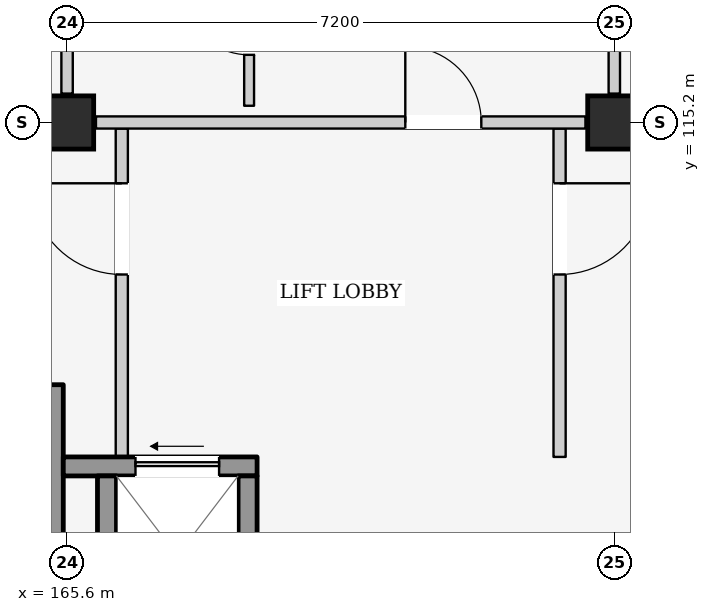
"""IFC4 building model, lengths in metres.
Left out: names, types, materials, properties, quantities, classifications, styles, units other than length and angle.
Written with IfcOpenShell. Run it as: python <this file> out.ifc"""

import sys

from ifc_helpers import new_model, si_unit, direction, frame, frame_2d, origin, origin_2d, place, context, subcontext, project, spatial, rectangle, extrude, element, fill, save


model = new_model("IFC4")
c1 = context("Model", 3, precision=1e-05, world=origin(), true_north=direction((0.0, 1.0)))
c2 = subcontext(c1, "Body", "Model", "MODEL_VIEW")
j1 = project(units=[si_unit("LENGTHUNIT", "METRE"), si_unit("PLANEANGLEUNIT", "RADIAN")], contexts=[c1])
p1 = place(None, origin())
s1 = spatial("IfcSite", under=j1, at=p1, CompositionType="ELEMENT")
p2 = place(p1, origin())
s2 = spatial("IfcBuilding", under=s1, at=p2, CompositionType="ELEMENT")
p3 = place(p2, frame((0.0, 0.0, 4.5)))
s3 = spatial("IfcBuildingStorey", under=s2, at=p3, CompositionType="ELEMENT", Elevation=4.5)
for number, where, z_axis, x_axis in (
    (1, (165.6, 115.2, 0.0), (0.0, 0.0, 1.0), (1.0, 0.0, 0.0)),
    (2, (172.8, 115.2, 0.0), (0.0, 0.0, 1.0), (1.0, 0.0, 0.0)),
):
    element("IfcColumn", number, at=place(p3, frame(where, z_axis=z_axis, x_axis=x_axis)), inside=s3, PredefinedType="COLUMN", context=c2, shape_type="SweptSolid", body=[
        extrude(rectangle(XDim=0.7, YDim=0.7, at=origin_2d()), origin(), (0.0, 0.0, 1.0), 4.5),
    ])
p4 = place(p3, frame((165.4, 108.15, 0.0), z_axis=(0.0, 0.0, 1.0), x_axis=(0.0, 1.0, 0.0)))
e3 = element("IfcWall", 3, at=p4, inside=s3, PredefinedType="SHEAR", context=c2, shape_type="SweptSolid", body=[
    extrude(rectangle(XDim=3.6, YDim=0.3, at=frame_2d((1.8, 0.0))), origin(), (0.0, 0.0, 1.0), 4.25),
])
p5 = place(p3, frame((166.32, 110.8, 0.0), z_axis=(0.0, 0.0, 1.0), x_axis=(0.0, 1.0, 0.0)))
e4 = element("IfcWall", 4, at=p5, inside=s3, PredefinedType="PARTITIONING", context=c2, shape_type="SweptSolid", body=[
    extrude(rectangle(XDim=4.32, YDim=0.16, at=frame_2d((2.16, 0.0))), origin(), (0.0, 0.0, 1.0), 4.25),
])
p6 = place(p5, frame((2.4, 0.0, 0.0)))
e5 = element("IfcOpeningElement", 5, at=p6, cuts=e4, PredefinedType="OPENING", context=c2, shape_type="SweptSolid", body=[
    extrude(rectangle(XDim=1.2, YDim=2.2, at=frame_2d((0.6, 1.1))), frame((0.0, 0.095, 0.0), z_axis=(0.0, -1.0, 0.0), x_axis=(1.0, 0.0, 0.0)), (0.0, 0.0, 1.0), 0.19),
])
p7 = place(p3, frame((172.08, 110.8, 0.0), z_axis=(0.0, 0.0, 1.0), x_axis=(0.0, 1.0, 0.0)))
e6 = element("IfcWall", 6, at=p7, inside=s3, PredefinedType="PARTITIONING", context=c2, shape_type="SweptSolid", body=[
    extrude(rectangle(XDim=4.32, YDim=0.16, at=frame_2d((2.16, 0.0))), origin(), (0.0, 0.0, 1.0), 4.25),
])
p8 = place(p7, frame((2.4, 0.0, 0.0)))
e7 = element("IfcOpeningElement", 7, at=p8, cuts=e6, PredefinedType="OPENING", context=c2, shape_type="SweptSolid", body=[
    extrude(rectangle(XDim=1.2, YDim=2.2, at=frame_2d((0.6, 1.1))), frame((0.0, 0.095, 0.0), z_axis=(0.0, -1.0, 0.0), x_axis=(1.0, 0.0, 0.0)), (0.0, 0.0, 1.0), 0.19),
])
p9 = place(p3, frame((165.55, 110.675, 0.0), z_axis=(0.0, 0.0, 1.0), x_axis=(1.0, 0.0, 0.0)))
e8 = element("IfcWall", 8, at=p9, inside=s3, PredefinedType="SHEAR", context=c2, shape_type="SweptSolid", body=[
    extrude(rectangle(XDim=2.55, YDim=0.25, at=frame_2d((1.275, 0.0))), origin(), (0.0, 0.0, 1.0), 4.25),
])
p10 = place(p9, frame((0.95, 0.0, 0.0)))
e9 = element("IfcOpeningElement", 9, at=p10, cuts=e8, PredefinedType="OPENING", context=c2, shape_type="SweptSolid", body=[
    extrude(rectangle(XDim=1.1, YDim=2.15, at=frame_2d((0.55, 1.075))), frame((0.0, 0.14, 0.0), z_axis=(0.0, -1.0, 0.0), x_axis=(1.0, 0.0, 0.0)), (0.0, 0.0, 1.0), 0.28),
])
for number, where, z_axis, x_axis in (
    (10, (166.125, 108.45, 0.0), (0.0, 0.0, 1.0), (0.0, 1.0, 0.0)),
    (11, (167.975, 108.45, 0.0), (0.0, 0.0, 1.0), (0.0, 1.0, 0.0)),
):
    element("IfcWall", number, at=place(p3, frame(where, z_axis=z_axis, x_axis=x_axis)), inside=s3, PredefinedType="SHEAR", context=c2, shape_type="SweptSolid", body=[
        extrude(rectangle(XDim=2.1, YDim=0.25, at=frame_2d((1.05, 0.0))), origin(), (0.0, 0.0, 1.0), 4.25),
    ])
p11 = place(p3, frame((165.6, 115.58, 0.0), z_axis=(0.0, 0.0, 1.0), x_axis=(0.0, 1.0, 0.0)))
e12 = element("IfcWall", 12, at=p11, inside=s3, PredefinedType="PARTITIONING", context=c2, shape_type="SweptSolid", body=[
    extrude(rectangle(XDim=6.44, YDim=0.15, at=frame_2d((3.22, 0.0))), origin(), (0.0, 0.0, 1.0), 3.685),
])
p12 = place(p3, frame((165.98, 115.2, 0.0), z_axis=(0.0, 0.0, 1.0), x_axis=(1.0, 0.0, 0.0)))
e13 = element("IfcWall", 13, at=p12, inside=s3, PredefinedType="PARTITIONING", context=c2, shape_type="SweptSolid", body=[
    extrude(rectangle(XDim=6.44, YDim=0.16, at=frame_2d((3.22, 0.0))), origin(), (0.0, 0.0, 1.0), 3.635),
])
p13 = place(p12, frame((4.07, 0.0, 0.0)))
e14 = element("IfcOpeningElement", 14, at=p13, cuts=e13, PredefinedType="OPENING", context=c2, shape_type="SweptSolid", body=[
    extrude(rectangle(XDim=1.0, YDim=2.15, at=frame_2d((0.5, 1.075))), frame((0.0, 0.095, 0.0), z_axis=(0.0, -1.0, 0.0), x_axis=(1.0, 0.0, 0.0)), (0.0, 0.0, 1.0), 0.19),
])
p14 = place(p3, frame((172.8, 115.58, 0.0), z_axis=(0.0, 0.0, 1.0), x_axis=(0.0, 1.0, 0.0)))
e15 = element("IfcWall", 15, at=p14, inside=s3, PredefinedType="PARTITIONING", context=c2, shape_type="SweptSolid", body=[
    extrude(rectangle(XDim=6.44, YDim=0.15, at=frame_2d((3.22, 0.0))), origin(), (0.0, 0.0, 1.0), 3.685),
])
p15 = place(p3, frame((167.995, 115.42, 0.0), z_axis=(0.0, 0.0, 1.0), x_axis=(0.0, 1.0, 0.0)))
e16 = element("IfcWall", 16, at=p15, inside=s3, PredefinedType="PARTITIONING", context=c2, shape_type="SweptSolid", body=[
    extrude(rectangle(XDim=2.22, YDim=0.13, at=frame_2d((1.11, 0.0))), origin(), (0.0, 0.0, 1.0), 4.25),
])
p16 = place(p15, frame((0.67, 0.0, 0.0)))
e17 = element("IfcOpeningElement", 17, at=p16, cuts=e16, PredefinedType="OPENING", context=c2, shape_type="SweptSolid", body=[
    extrude(rectangle(XDim=0.88, YDim=2.1, at=frame_2d((0.44, 1.05))), frame((0.0, 0.08, 0.0), z_axis=(0.0, -1.0, 0.0), x_axis=(1.0, 0.0, 0.0)), (0.0, 0.0, 1.0), 0.16),
])
p17 = place(p6, origin())
e18 = element("IfcDoor", 18, at=p17, inside=s3, OperationType="SINGLE_SWING_RIGHT", PredefinedType="DOOR", context=c2, shape_type="SweptSolid", body=[
    extrude(rectangle(XDim=1.2, YDim=2.2, at=frame_2d((0.6, 1.1))), frame((0.0, 0.025, 0.0), z_axis=(0.0, -1.0, 0.0), x_axis=(1.0, 0.0, 0.0)), (0.0, 0.0, 1.0), 0.05),
])
fill(e5, e18)
p18 = place(p8, frame((1.2, 0.0, 0.0), z_axis=(0.0, 0.0, 1.0), x_axis=(-1.0, 0.0, 0.0)))
e19 = element("IfcDoor", 19, at=p18, inside=s3, OperationType="SINGLE_SWING_LEFT", PredefinedType="DOOR", context=c2, shape_type="SweptSolid", body=[
    extrude(rectangle(XDim=1.2, YDim=2.2, at=frame_2d((0.6, 1.1))), frame((0.0, 0.025, 0.0), z_axis=(0.0, -1.0, 0.0), x_axis=(1.0, 0.0, 0.0)), (0.0, 0.0, 1.0), 0.05),
])
fill(e7, e19)
p19 = place(p10, origin())
e20 = element("IfcDoor", 20, at=p19, inside=s3, OperationType="SLIDING_TO_LEFT", PredefinedType="DOOR", context=c2, shape_type="SweptSolid", body=[
    extrude(rectangle(XDim=1.1, YDim=2.15, at=frame_2d((0.55, 1.075))), frame((0.0, 0.025, 0.0), z_axis=(0.0, -1.0, 0.0), x_axis=(1.0, 0.0, 0.0)), (0.0, 0.0, 1.0), 0.05),
])
fill(e9, e20)
p20 = place(p13, origin())
e21 = element("IfcDoor", 21, at=p20, inside=s3, OperationType="SINGLE_SWING_LEFT", PredefinedType="DOOR", context=c2, shape_type="SweptSolid", body=[
    extrude(rectangle(XDim=1.0, YDim=2.15, at=frame_2d((0.5, 1.075))), frame((0.0, 0.025, 0.0), z_axis=(0.0, -1.0, 0.0), x_axis=(1.0, 0.0, 0.0)), (0.0, 0.0, 1.0), 0.05),
])
fill(e14, e21)
p21 = place(p16, origin())
e22 = element("IfcDoor", 22, at=p21, inside=s3, OperationType="SINGLE_SWING_RIGHT", PredefinedType="DOOR", context=c2, shape_type="SweptSolid", body=[
    extrude(rectangle(XDim=0.88, YDim=2.1, at=frame_2d((0.44, 1.05))), frame((0.0, 0.025, 0.0), z_axis=(0.0, -1.0, 0.0), x_axis=(1.0, 0.0, 0.0)), (0.0, 0.0, 1.0), 0.05),
])
fill(e17, e22)
save(model, sys.argv[1])
